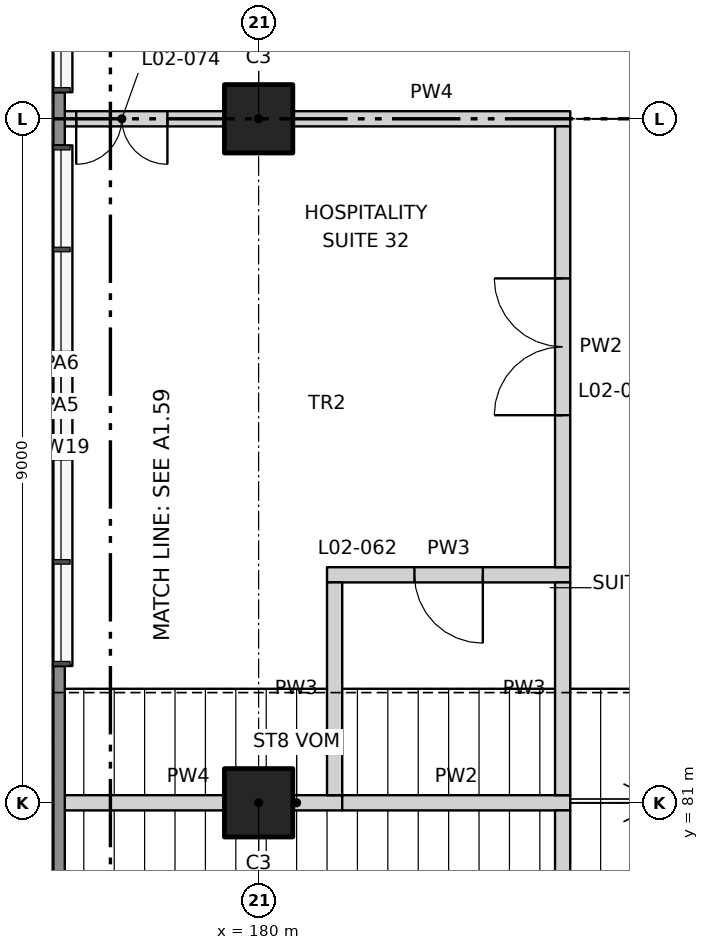
"""IFC4 building model, lengths in metres.
Left out: names, types, materials, properties, quantities, classifications, styles, units other than length and angle.
Written with IfcOpenShell. Run it as: python <this file> out.ifc"""

import sys

from ifc_helpers import new_model, si_unit, direction, frame, frame_2d, origin, origin_2d, place, context, subcontext, project, spatial, polyline, rectangle, outline, extrude, element, fill, save


model = new_model("IFC4")
c1 = context("Model", 3, precision=1e-05, world=origin(), true_north=direction((0.0, 1.0)))
c2 = subcontext(c1, "Body", "Model", "MODEL_VIEW")
j1 = project(units=[si_unit("LENGTHUNIT", "METRE"), si_unit("PLANEANGLEUNIT", "RADIAN")], contexts=[c1])
p1 = place(None, origin())
s1 = spatial("IfcSite", under=j1, at=p1, CompositionType="ELEMENT")
p2 = place(p1, origin())
s2 = spatial("IfcBuilding", under=s1, at=p2, CompositionType="ELEMENT")
p3 = place(p2, frame((0.0, 0.0, 11.5)))
s3 = spatial("IfcBuildingStorey", under=s2, at=p3, CompositionType="ELEMENT", Elevation=11.5)
for number, where, z_axis, x_axis in (
    (1, (180.0, 81.0, 0.0), (0.0, 0.0, 1.0), (1.0, 0.0, 0.0)),
    (2, (180.0, 90.0, 0.0), (0.0, 0.0, 1.0), (1.0, 0.0, 0.0)),
):
    element("IfcColumn", number, at=place(p3, frame(where, z_axis=z_axis, x_axis=x_axis)), inside=s3, PredefinedType="COLUMN", context=c2, shape_type="SweptSolid", body=[
        extrude(rectangle(XDim=0.9, YDim=0.9, at=origin_2d()), origin(), (0.0, 0.0, 1.0), 4.506),
    ])
p4 = place(p3, frame((180.45, 81.0, 0.0), z_axis=(0.0, 0.0, 1.0), x_axis=(1.0, 0.0, 0.0)))
e3 = element("IfcWall", 3, at=p4, inside=s3, PredefinedType="PARTITIONING", context=c2, shape_type="SweptSolid", body=[
    extrude(rectangle(XDim=0.65, YDim=0.2, at=frame_2d((0.325, 0.0))), origin(), (0.0, 0.0, 1.0), 4.439),
])
p5 = place(p3, frame((177.4, 81.0, 0.0), z_axis=(0.0, 0.0, 1.0), x_axis=(1.0, 0.0, 0.0)))
e4 = element("IfcWall", 4, at=p5, inside=s3, PredefinedType="PARTITIONING", context=c2, shape_type="SweptSolid", body=[
    extrude(rectangle(XDim=2.15, YDim=0.2, at=frame_2d((1.075, 0.0))), origin(), (0.0, 0.0, 1.0), 1.939),
])
p6 = place(p3, frame((181.1, 81.0, 0.0), z_axis=(0.0, 0.0, 1.0), x_axis=(1.0, 0.0, 0.0)))
e5 = element("IfcWall", 5, at=p6, inside=s3, PredefinedType="PARTITIONING", context=c2, shape_type="SweptSolid", body=[
    extrude(rectangle(XDim=3.0, YDim=0.2, at=frame_2d((1.5, 0.0))), origin(), (0.0, 0.0, 1.0), 4.439),
])
p7 = place(p3, frame((180.9, 84.0, 0.0), z_axis=(0.0, 0.0, 1.0), x_axis=(1.0, 0.0, 0.0)))
e6 = element("IfcWall", 6, at=p7, inside=s3, PredefinedType="PARTITIONING", context=c2, shape_type="SweptSolid", body=[
    extrude(outline(polyline([(0.0, 0.0), (3.2, 0.0), (3.2, 8.32), (2.286, 7.749), (0.0, 6.32), (0.0, 0.0)])), frame((0.0, 0.1, 0.0), z_axis=(0.0, -1.0, 0.0), x_axis=(1.0, 0.0, 0.0)), (0.0, 0.0, 1.0), 0.2),
])
p8 = place(p7, frame((1.15, 0.0, 0.0)))
e7 = element("IfcOpeningElement", 7, at=p8, cuts=e6, PredefinedType="OPENING", context=c2, shape_type="SweptSolid", body=[
    extrude(rectangle(XDim=0.9, YDim=2.1, at=frame_2d((0.45, 1.05))), frame((0.0, 0.11, 0.0), z_axis=(0.0, -1.0, 0.0), x_axis=(1.0, 0.0, 0.0)), (0.0, 0.0, 1.0), 0.22),
])
p9 = place(p3, frame((180.45, 90.0, 0.0), z_axis=(0.0, 0.0, 1.0), x_axis=(1.0, 0.0, 0.0)))
e8 = element("IfcWall", 8, at=p9, inside=s3, PredefinedType="PARTITIONING", context=c2, shape_type="SweptSolid", body=[
    extrude(rectangle(XDim=3.65, YDim=0.2, at=frame_2d((1.825, 0.0))), origin(), (0.0, 0.0, 1.0), 4.439),
])
p10 = place(p3, frame((177.4, 90.0, 0.0), z_axis=(0.0, 0.0, 1.0), x_axis=(1.0, 0.0, 0.0)))
e9 = element("IfcWall", 9, at=p10, inside=s3, PredefinedType="PARTITIONING", context=c2, shape_type="SweptSolid", body=[
    extrude(outline(polyline([(0.0, 0.0), (2.15, 0.0), (2.15, 2.877), (0.071, 2.877), (0.0, 2.833), (0.0, 0.0)])), frame((0.0, 0.1, 0.0), z_axis=(0.0, -1.0, 0.0), x_axis=(1.0, 0.0, 0.0)), (0.0, 0.0, 1.0), 0.2),
])
p11 = place(p10, frame((0.2, 0.0, 0.0)))
e10 = element("IfcOpeningElement", 10, at=p11, cuts=e9, PredefinedType="OPENING", context=c2, shape_type="SweptSolid", body=[
    extrude(rectangle(XDim=1.2, YDim=2.1, at=frame_2d((0.6, 1.05))), frame((0.0, 0.11, 0.0), z_axis=(0.0, -1.0, 0.0), x_axis=(1.0, 0.0, 0.0)), (0.0, 0.0, 1.0), 0.22),
])
p12 = place(p3, frame((181.0, 81.1, 0.0), z_axis=(0.0, 0.0, 1.0), x_axis=(0.0, 1.0, 0.0)))
e11 = element("IfcWall", 11, at=p12, inside=s3, PredefinedType="PARTITIONING", context=c2, shape_type="SweptSolid", body=[
    extrude(rectangle(XDim=2.8, YDim=0.2, at=frame_2d((1.4, 0.0))), origin(), (0.0, 0.0, 1.0), 6.383),
])
p13 = place(p3, frame((184.0, 75.1, 0.0), z_axis=(0.0, 0.0, 1.0), x_axis=(0.0, 1.0, 0.0)))
e12 = element("IfcWall", 12, at=p13, inside=s3, PredefinedType="PARTITIONING", context=c2, shape_type="SweptSolid", body=[
    extrude(rectangle(XDim=5.8, YDim=0.2, at=frame_2d((2.9, 0.0))), origin(), (0.0, 0.0, 1.0), 8.258),
])
p14 = place(p13, frame((2.0, 0.0, 0.0)))
e13 = element("IfcOpeningElement", 13, at=p14, cuts=e12, PredefinedType="OPENING", context=c2, shape_type="SweptSolid", body=[
    extrude(rectangle(XDim=1.8, YDim=2.1, at=frame_2d((0.9, 1.05))), frame((0.0, 0.11, 0.0), z_axis=(0.0, -1.0, 0.0), x_axis=(1.0, 0.0, 0.0)), (0.0, 0.0, 1.0), 0.22),
])
p15 = place(p3, frame((184.0, 81.1, 0.0), z_axis=(0.0, 0.0, 1.0), x_axis=(0.0, 1.0, 0.0)))
e14 = element("IfcWall", 14, at=p15, inside=s3, PredefinedType="PARTITIONING", context=c2, shape_type="SweptSolid", body=[
    extrude(rectangle(XDim=2.8, YDim=0.2, at=frame_2d((1.4, 0.0))), origin(), (0.0, 0.0, 1.0), 8.258),
])
p16 = place(p3, frame((184.0, 84.1, 0.0), z_axis=(0.0, 0.0, 1.0), x_axis=(0.0, 1.0, 0.0)))
e15 = element("IfcWall", 15, at=p16, inside=s3, PredefinedType="PARTITIONING", context=c2, shape_type="SweptSolid", body=[
    extrude(rectangle(XDim=5.8, YDim=0.2, at=frame_2d((2.9, 0.0))), origin(), (0.0, 0.0, 1.0), 8.258),
])
p17 = place(p16, frame((2.0, 0.0, 0.0)))
e16 = element("IfcOpeningElement", 16, at=p17, cuts=e15, PredefinedType="OPENING", context=c2, shape_type="SweptSolid", body=[
    extrude(rectangle(XDim=1.8, YDim=2.1, at=frame_2d((0.9, 1.05))), frame((0.0, 0.11, 0.0), z_axis=(0.0, -1.0, 0.0), x_axis=(1.0, 0.0, 0.0)), (0.0, 0.0, 1.0), 0.22),
])
p18 = place(p3, frame((177.35, 82.8, 0.0), z_axis=(0.0, 0.0, 1.0), x_axis=(0.0, 1.0, 0.0)))
e17 = element("IfcWall", 17, at=p18, inside=s3, PredefinedType="SOLIDWALL", context=c2, shape_type="SweptSolid", body=[
    extrude(rectangle(XDim=6.85, YDim=0.2, at=frame_2d((3.425, 0.0))), origin(), (0.0, 0.0, 1.0), 1.1),
])
p19 = place(p3, frame((177.35, 90.35, 0.0), z_axis=(0.0, 0.0, 1.0), x_axis=(0.0, 1.0, 0.0)))
e18 = element("IfcWall", 18, at=p19, inside=s3, PredefinedType="SOLIDWALL", context=c2, shape_type="SweptSolid", body=[
    extrude(rectangle(XDim=8.35, YDim=0.2, at=frame_2d((4.175, 0.0))), origin(), (0.0, 0.0, 1.0), 1.1),
])
p20 = place(p3, frame((177.35, 79.2, 0.0), z_axis=(0.0, 0.0, 1.0), x_axis=(0.0, 1.0, 0.0)))
e19 = element("IfcWall", 19, at=p20, inside=s3, PredefinedType="SOLIDWALL", context=c2, shape_type="SweptSolid", body=[
    extrude(rectangle(XDim=3.6, YDim=0.2, at=frame_2d((1.8, 0.0))), origin(), (0.0, 0.0, 1.0), 4.034),
])
p21 = place(p3, frame((177.35, 89.65, 0.0), z_axis=(0.0, 0.0, 1.0), x_axis=(0.0, 1.0, 0.0)))
e20 = element("IfcWall", 20, at=p21, inside=s3, PredefinedType="SOLIDWALL", context=c2, shape_type="SweptSolid", body=[
    extrude(rectangle(XDim=0.7, YDim=0.2, at=frame_2d((0.35, 0.0))), origin(), (0.0, 0.0, 1.0), 4.034),
])
p22 = place(p17, origin())
e21 = element("IfcDoor", 21, at=p22, inside=s3, OperationType="DOUBLE_DOOR_DOUBLE_SWING", PredefinedType="DOOR", context=c2, shape_type="SweptSolid", body=[
    extrude(rectangle(XDim=1.8, YDim=2.1, at=frame_2d((0.9, 1.05))), frame((0.0, 0.025, 0.0), z_axis=(0.0, -1.0, 0.0), x_axis=(1.0, 0.0, 0.0)), (0.0, 0.0, 1.0), 0.05),
])
fill(e16, e21)
p23 = place(p8, frame((0.9, 0.0, 0.0), z_axis=(0.0, 0.0, 1.0), x_axis=(-1.0, 0.0, 0.0)))
e22 = element("IfcDoor", 22, at=p23, inside=s3, OperationType="SINGLE_SWING_LEFT", PredefinedType="DOOR", context=c2, shape_type="SweptSolid", body=[
    extrude(rectangle(XDim=0.9, YDim=2.1, at=frame_2d((0.45, 1.05))), frame((0.0, 0.025, 0.0), z_axis=(0.0, -1.0, 0.0), x_axis=(1.0, 0.0, 0.0)), (0.0, 0.0, 1.0), 0.05),
])
fill(e7, e22)
p24 = place(p11, frame((1.2, 0.0, 0.0), z_axis=(0.0, 0.0, 1.0), x_axis=(-1.0, 0.0, 0.0)))
e23 = element("IfcDoor", 23, at=p24, inside=s3, OperationType="DOUBLE_DOOR_DOUBLE_SWING", PredefinedType="DOOR", context=c2, shape_type="SweptSolid", body=[
    extrude(rectangle(XDim=1.2, YDim=2.1, at=frame_2d((0.6, 1.05))), frame((0.0, 0.025, 0.0), z_axis=(0.0, -1.0, 0.0), x_axis=(1.0, 0.0, 0.0)), (0.0, 0.0, 1.0), 0.05),
])
fill(e10, e23)
save(model, sys.argv[1])
